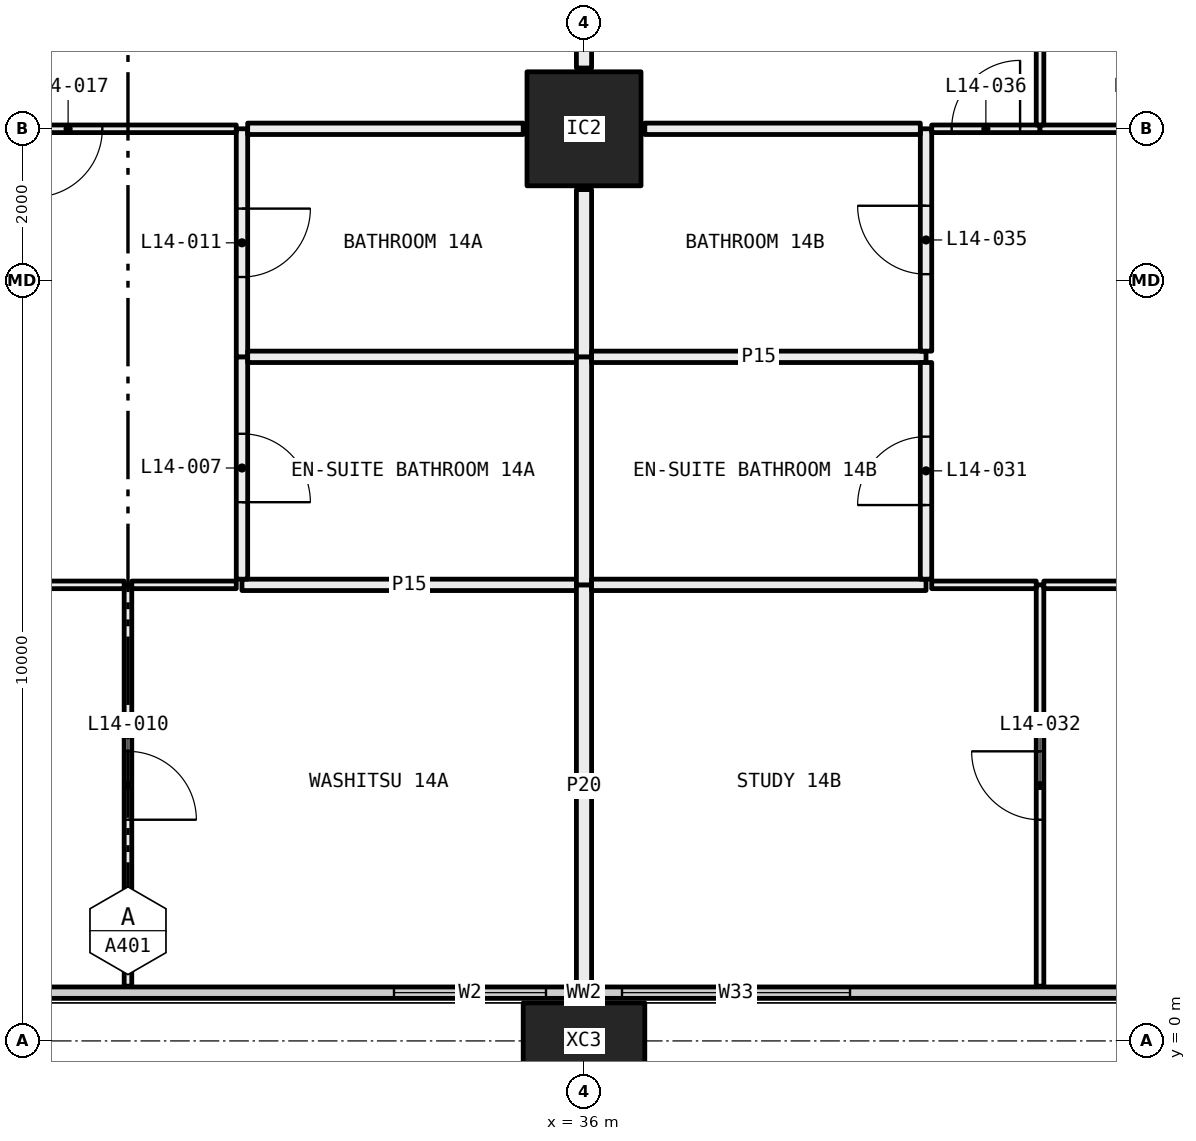
"""IFC4 building model, lengths in metres.
Left out: names, types, materials, properties, quantities, classifications, styles, units other than length and angle.
Written with IfcOpenShell. Run it as: python <this file> out.ifc"""

import sys

from ifc_helpers import new_model, si_unit, direction, frame, frame_2d, origin, origin_2d, place, context, subcontext, project, spatial, rectangle, hollow_rectangle, extrude, element, fill, save


model = new_model("IFC4")
c1 = context("Model", 3, precision=1e-05, world=origin(), true_north=direction((0.0, 1.0)))
c2 = subcontext(c1, "Body", "Model", "MODEL_VIEW")
j1 = project(units=[si_unit("LENGTHUNIT", "METRE"), si_unit("PLANEANGLEUNIT", "RADIAN")], contexts=[c1])
p1 = place(None, origin())
s1 = spatial("IfcSite", under=j1, at=p1, CompositionType="ELEMENT")
p2 = place(p1, origin())
s2 = spatial("IfcBuilding", under=s1, at=p2, CompositionType="ELEMENT")
p3 = place(p2, frame((0.0, 0.0, 61.05)))
s3 = spatial("IfcBuildingStorey", under=s2, at=p3, CompositionType="ELEMENT", Elevation=61.05)
p4 = place(p3, frame((36.0, 0.0, -0.4), z_axis=(0.0, 0.0, 1.0), x_axis=(1.0, 0.0, 0.0)))
e1 = element("IfcColumn", 1, at=p4, inside=s3, PredefinedType="COLUMN", context=c2, shape_type="SweptSolid", body=[
    extrude(hollow_rectangle(XDim=1.6, YDim=1.0, WallThickness=0.065, at=origin_2d()), origin(), (0.0, 0.0, 1.0), 3.45),
])
p5 = place(p3, frame((36.0, 12.0, 0.0), z_axis=(0.0, 0.0, 1.0), x_axis=(1.0, 0.0, 0.0)))
e2 = element("IfcColumn", 2, at=p5, inside=s3, PredefinedType="COLUMN", context=c2, shape_type="SweptSolid", body=[
    extrude(hollow_rectangle(XDim=1.5, YDim=1.5, WallThickness=0.065, at=origin_2d()), origin(), (0.0, 0.0, 1.0), 3.05),
])
p6 = place(p3, frame((6.56, 0.635, 0.0), z_axis=(0.0, 0.0, 1.0), x_axis=(1.0, 0.0, 0.0)))
e3 = element("IfcWall", 3, at=p6, inside=s3, PredefinedType="ELEMENTEDWALL", context=c2, shape_type="SweptSolid", body=[
    extrude(rectangle(XDim=58.88, YDim=0.15, at=frame_2d((29.44, 0.0))), origin(), (0.0, 0.0, 1.0), 3.05),
])
p7 = place(p6, frame((0.44, 0.0, 0.45)))
e4 = element("IfcOpeningElement", 4, at=p7, cuts=e3, PredefinedType="OPENING", context=c2, shape_type="SweptSolid", body=[
    extrude(rectangle(XDim=4.5, YDim=2.55, at=frame_2d((2.25, 1.275))), frame((0.0, 0.085, 0.0), z_axis=(0.0, -1.0, 0.0), x_axis=(1.0, 0.0, 0.0)), (0.0, 0.0, 1.0), 0.17),
])
p8 = place(p6, frame((5.94, 0.0, 0.45)))
e5 = element("IfcOpeningElement", 5, at=p8, cuts=e3, PredefinedType="OPENING", context=c2, shape_type="SweptSolid", body=[
    extrude(rectangle(XDim=3.0, YDim=2.55, at=frame_2d((1.5, 1.275))), frame((0.0, 0.085, 0.0), z_axis=(0.0, -1.0, 0.0), x_axis=(1.0, 0.0, 0.0)), (0.0, 0.0, 1.0), 0.17),
])
p9 = place(p6, frame((13.94, 0.0, 0.45)))
e6 = element("IfcOpeningElement", 6, at=p9, cuts=e3, PredefinedType="OPENING", context=c2, shape_type="SweptSolid", body=[
    extrude(rectangle(XDim=3.0, YDim=2.55, at=frame_2d((1.5, 1.275))), frame((0.0, 0.085, 0.0), z_axis=(0.0, -1.0, 0.0), x_axis=(1.0, 0.0, 0.0)), (0.0, 0.0, 1.0), 0.17),
])
p10 = place(p6, frame((17.94, 0.0, 0.45)))
e7 = element("IfcOpeningElement", 7, at=p10, cuts=e3, PredefinedType="OPENING", context=c2, shape_type="SweptSolid", body=[
    extrude(rectangle(XDim=3.0, YDim=2.55, at=frame_2d((1.5, 1.275))), frame((0.0, 0.085, 0.0), z_axis=(0.0, -1.0, 0.0), x_axis=(1.0, 0.0, 0.0)), (0.0, 0.0, 1.0), 0.17),
])
p11 = place(p6, frame((26.94, 0.0, 0.45)))
e8 = element("IfcOpeningElement", 8, at=p11, cuts=e3, PredefinedType="OPENING", context=c2, shape_type="SweptSolid", body=[
    extrude(rectangle(XDim=2.0, YDim=2.55, at=frame_2d((1.0, 1.275))), frame((0.0, 0.085, 0.0), z_axis=(0.0, -1.0, 0.0), x_axis=(1.0, 0.0, 0.0)), (0.0, 0.0, 1.0), 0.17),
])
p12 = place(p6, frame((29.94, 0.0, 0.45)))
e9 = element("IfcOpeningElement", 9, at=p12, cuts=e3, PredefinedType="OPENING", context=c2, shape_type="SweptSolid", body=[
    extrude(rectangle(XDim=3.0, YDim=2.55, at=frame_2d((1.5, 1.275))), frame((0.0, 0.085, 0.0), z_axis=(0.0, -1.0, 0.0), x_axis=(1.0, 0.0, 0.0)), (0.0, 0.0, 1.0), 0.17),
])
p13 = place(p6, frame((37.94, 0.0, 0.45)))
e10 = element("IfcOpeningElement", 10, at=p13, cuts=e3, PredefinedType="OPENING", context=c2, shape_type="SweptSolid", body=[
    extrude(rectangle(XDim=3.0, YDim=2.55, at=frame_2d((1.5, 1.275))), frame((0.0, 0.085, 0.0), z_axis=(0.0, -1.0, 0.0), x_axis=(1.0, 0.0, 0.0)), (0.0, 0.0, 1.0), 0.17),
])
p14 = place(p6, frame((41.94, 0.0, 0.45)))
e11 = element("IfcOpeningElement", 11, at=p14, cuts=e3, PredefinedType="OPENING", context=c2, shape_type="SweptSolid", body=[
    extrude(rectangle(XDim=3.0, YDim=2.55, at=frame_2d((1.5, 1.275))), frame((0.0, 0.085, 0.0), z_axis=(0.0, -1.0, 0.0), x_axis=(1.0, 0.0, 0.0)), (0.0, 0.0, 1.0), 0.17),
])
p15 = place(p6, frame((50.94, 0.0, 0.45)))
e12 = element("IfcOpeningElement", 12, at=p15, cuts=e3, PredefinedType="OPENING", context=c2, shape_type="SweptSolid", body=[
    extrude(rectangle(XDim=2.0, YDim=2.55, at=frame_2d((1.0, 1.275))), frame((0.0, 0.085, 0.0), z_axis=(0.0, -1.0, 0.0), x_axis=(1.0, 0.0, 0.0)), (0.0, 0.0, 1.0), 0.17),
])
p16 = place(p6, frame((53.94, 0.0, 0.45)))
e13 = element("IfcOpeningElement", 13, at=p16, cuts=e3, PredefinedType="OPENING", context=c2, shape_type="SweptSolid", body=[
    extrude(rectangle(XDim=4.5, YDim=2.55, at=frame_2d((2.25, 1.275))), frame((0.0, 0.085, 0.0), z_axis=(0.0, -1.0, 0.0), x_axis=(1.0, 0.0, 0.0)), (0.0, 0.0, 1.0), 0.17),
])
p17 = place(p3, frame((30.0, 0.72, 0.0), z_axis=(0.0, 0.0, 1.0), x_axis=(0.0, 1.0, 0.0)))
e14 = element("IfcWall", 14, at=p17, inside=s3, PredefinedType="PARTITIONING", context=c2, shape_type="SweptSolid", body=[
    extrude(rectangle(XDim=5.28, YDim=0.1, at=frame_2d((2.64, 0.0))), origin(), (0.0, 0.0, 1.0), 3.05),
])
p18 = place(p17, frame((2.19, 0.0, 0.0)))
e15 = element("IfcOpeningElement", 15, at=p18, cuts=e14, PredefinedType="OPENING", context=c2, shape_type="SweptSolid", body=[
    extrude(rectangle(XDim=0.9, YDim=2.1, at=frame_2d((0.45, 1.05))), frame((0.0, 0.06, 0.0), z_axis=(0.0, -1.0, 0.0), x_axis=(1.0, 0.0, 0.0)), (0.0, 0.0, 1.0), 0.12),
])
p19 = place(p3, frame((29.95, 6.0, 0.0), z_axis=(0.0, 0.0, 1.0), x_axis=(-1.0, 0.0, 0.0)))
e16 = element("IfcWall", 16, at=p19, inside=s3, PredefinedType="PARTITIONING", context=c2, shape_type="SweptSolid", body=[
    extrude(rectangle(XDim=6.145, YDim=0.1, at=frame_2d((3.073, 0.0))), origin(), (0.0, 0.0, 1.0), 2.45),
])
p20 = place(p3, frame((31.425, 6.0, 0.0), z_axis=(0.0, 0.0, 1.0), x_axis=(-1.0, 0.0, 0.0)))
e17 = element("IfcWall", 17, at=p20, inside=s3, PredefinedType="PARTITIONING", context=c2, shape_type="SweptSolid", body=[
    extrude(rectangle(XDim=1.375, YDim=0.1, at=frame_2d((0.688, 0.0))), origin(), (0.0, 0.0, 1.0), 3.05),
])
p21 = place(p3, frame((35.9, 6.0, 0.0), z_axis=(0.0, 0.0, 1.0), x_axis=(-1.0, 0.0, 0.0)))
e18 = element("IfcWall", 18, at=p21, inside=s3, PredefinedType="PARTITIONING", context=c2, shape_type="SweptSolid", body=[
    extrude(rectangle(XDim=4.4, YDim=0.15, at=frame_2d((2.2, 0.0))), origin(), (0.0, 0.0, 1.0), 3.05),
])
p22 = place(p3, frame((36.0, 0.72, 0.0), z_axis=(0.0, 0.0, 1.0), x_axis=(0.0, 1.0, 0.0)))
e19 = element("IfcWall", 19, at=p22, inside=s3, PredefinedType="PARTITIONING", context=c2, shape_type="SweptSolid", body=[
    extrude(rectangle(XDim=5.28, YDim=0.2, at=frame_2d((2.64, 0.0))), origin(), (0.0, 0.0, 1.0), 2.45),
])
p23 = place(p3, frame((31.5, 6.075, 0.0), z_axis=(0.0, 0.0, 1.0), x_axis=(0.0, 1.0, 0.0)))
e20 = element("IfcWall", 20, at=p23, inside=s3, PredefinedType="PARTITIONING", context=c2, shape_type="SweptSolid", body=[
    extrude(rectangle(XDim=2.925, YDim=0.15, at=frame_2d((1.462, 0.0))), origin(), (0.0, 0.0, 1.0), 3.05),
])
p24 = place(p23, frame((1.012, 0.0, 0.0)))
e21 = element("IfcOpeningElement", 21, at=p24, cuts=e20, PredefinedType="OPENING", context=c2, shape_type="SweptSolid", body=[
    extrude(rectangle(XDim=0.9, YDim=2.1, at=frame_2d((0.45, 1.05))), frame((0.0, 0.085, 0.0), z_axis=(0.0, -1.0, 0.0), x_axis=(1.0, 0.0, 0.0)), (0.0, 0.0, 1.0), 0.17),
])
p25 = place(p3, frame((31.5, 9.0, 0.0), z_axis=(0.0, 0.0, 1.0), x_axis=(0.0, 1.0, 0.0)))
e22 = element("IfcWall", 22, at=p25, inside=s3, PredefinedType="PARTITIONING", context=c2, shape_type="SweptSolid", body=[
    extrude(rectangle(XDim=3.0, YDim=0.15, at=frame_2d((1.5, 0.0))), origin(), (0.0, 0.0, 1.0), 2.45),
])
p26 = place(p25, frame((1.05, 0.0, 0.0)))
e23 = element("IfcOpeningElement", 23, at=p26, cuts=e22, PredefinedType="OPENING", context=c2, shape_type="SweptSolid", body=[
    extrude(rectangle(XDim=0.9, YDim=2.1, at=frame_2d((0.45, 1.05))), frame((0.0, 0.085, 0.0), z_axis=(0.0, -1.0, 0.0), x_axis=(1.0, 0.0, 0.0)), (0.0, 0.0, 1.0), 0.17),
])
p27 = place(p3, frame((31.425, 12.0, 0.0), z_axis=(0.0, 0.0, 1.0), x_axis=(-1.0, 0.0, 0.0)))
e24 = element("IfcWall", 24, at=p27, inside=s3, PredefinedType="PARTITIONING", context=c2, shape_type="SweptSolid", body=[
    extrude(rectangle(XDim=4.425, YDim=0.1, at=frame_2d((2.212, 0.0))), origin(), (0.0, 0.0, 1.0), 2.45),
])
p28 = place(p27, frame((1.762, 0.0, 0.0)))
e25 = element("IfcOpeningElement", 25, at=p28, cuts=e24, PredefinedType="OPENING", context=c2, shape_type="SweptSolid", body=[
    extrude(rectangle(XDim=0.9, YDim=2.1, at=frame_2d((0.45, 1.05))), frame((0.0, 0.06, 0.0), z_axis=(0.0, -1.0, 0.0), x_axis=(1.0, 0.0, 0.0)), (0.0, 0.0, 1.0), 0.12),
])
p29 = place(p3, frame((35.9, 9.0, 0.0), z_axis=(0.0, 0.0, 1.0), x_axis=(-1.0, 0.0, 0.0)))
e26 = element("IfcWall", 26, at=p29, inside=s3, PredefinedType="PARTITIONING", context=c2, shape_type="SweptSolid", body=[
    extrude(rectangle(XDim=4.325, YDim=0.15, at=frame_2d((2.163, 0.0))), origin(), (0.0, 0.0, 1.0), 3.05),
])
p30 = place(p3, frame((36.0, 6.0, 0.0), z_axis=(0.0, 0.0, 1.0), x_axis=(0.0, 1.0, 0.0)))
e27 = element("IfcWall", 27, at=p30, inside=s3, PredefinedType="PARTITIONING", context=c2, shape_type="SweptSolid", body=[
    extrude(rectangle(XDim=3.0, YDim=0.2, at=frame_2d((1.5, 0.0))), origin(), (0.0, 0.0, 1.0), 2.45),
])
p31 = place(p3, frame((35.2, 12.0, 0.0), z_axis=(0.0, 0.0, 1.0), x_axis=(-1.0, 0.0, 0.0)))
e28 = element("IfcWall", 28, at=p31, inside=s3, PredefinedType="PARTITIONING", context=c2, shape_type="SweptSolid", body=[
    extrude(rectangle(XDim=3.625, YDim=0.15, at=frame_2d((1.812, 0.0))), origin(), (0.0, 0.0, 1.0), 2.45),
])
p32 = place(p3, frame((36.0, 9.0, 0.0), z_axis=(0.0, 0.0, 1.0), x_axis=(0.0, 1.0, 0.0)))
e29 = element("IfcWall", 29, at=p32, inside=s3, PredefinedType="PARTITIONING", context=c2, shape_type="SweptSolid", body=[
    extrude(rectangle(XDim=2.2, YDim=0.2, at=frame_2d((1.1, 0.0))), origin(), (0.0, 0.0, 1.0), 2.45),
])
p33 = place(p3, frame((36.0, 12.8, 0.0), z_axis=(0.0, 0.0, 1.0), x_axis=(0.0, 1.0, 0.0)))
e30 = element("IfcWall", 30, at=p33, inside=s3, PredefinedType="PARTITIONING", context=c2, shape_type="SweptSolid", body=[
    extrude(rectangle(XDim=5.2, YDim=0.2, at=frame_2d((2.6, 0.0))), origin(), (0.0, 0.0, 1.0), 2.45),
])
p34 = place(p3, frame((42.0, 0.72, 0.0), z_axis=(0.0, 0.0, 1.0), x_axis=(0.0, 1.0, 0.0)))
e31 = element("IfcWall", 31, at=p34, inside=s3, PredefinedType="PARTITIONING", context=c2, shape_type="SweptSolid", body=[
    extrude(rectangle(XDim=5.28, YDim=0.1, at=frame_2d((2.64, 0.0))), origin(), (0.0, 0.0, 1.0), 3.05),
])
p35 = place(p34, frame((2.19, 0.0, 0.0)))
e32 = element("IfcOpeningElement", 32, at=p35, cuts=e31, PredefinedType="OPENING", context=c2, shape_type="SweptSolid", body=[
    extrude(rectangle(XDim=0.9, YDim=2.1, at=frame_2d((0.45, 1.05))), frame((0.0, 0.06, 0.0), z_axis=(0.0, -1.0, 0.0), x_axis=(1.0, 0.0, 0.0)), (0.0, 0.0, 1.0), 0.12),
])
p36 = place(p3, frame((40.5, 6.0, 0.0), z_axis=(0.0, 0.0, 1.0), x_axis=(-1.0, 0.0, 0.0)))
e33 = element("IfcWall", 33, at=p36, inside=s3, PredefinedType="PARTITIONING", context=c2, shape_type="SweptSolid", body=[
    extrude(rectangle(XDim=4.4, YDim=0.15, at=frame_2d((2.2, 0.0))), origin(), (0.0, 0.0, 1.0), 3.05),
])
p37 = place(p3, frame((41.95, 6.0, 0.0), z_axis=(0.0, 0.0, 1.0), x_axis=(-1.0, 0.0, 0.0)))
e34 = element("IfcWall", 34, at=p37, inside=s3, PredefinedType="PARTITIONING", context=c2, shape_type="SweptSolid", body=[
    extrude(rectangle(XDim=1.375, YDim=0.1, at=frame_2d((0.688, 0.0))), origin(), (0.0, 0.0, 1.0), 3.05),
])
p38 = place(p3, frame((48.195, 6.0, 0.0), z_axis=(0.0, 0.0, 1.0), x_axis=(-1.0, 0.0, 0.0)))
e35 = element("IfcWall", 35, at=p38, inside=s3, PredefinedType="PARTITIONING", context=c2, shape_type="SweptSolid", body=[
    extrude(rectangle(XDim=6.145, YDim=0.1, at=frame_2d((3.073, 0.0))), origin(), (0.0, 0.0, 1.0), 2.45),
])
p39 = place(p3, frame((40.5, 9.0, 0.0), z_axis=(0.0, 0.0, 1.0), x_axis=(-1.0, 0.0, 0.0)))
e36 = element("IfcWall", 36, at=p39, inside=s3, PredefinedType="PARTITIONING", context=c2, shape_type="SweptSolid", body=[
    extrude(rectangle(XDim=4.4, YDim=0.15, at=frame_2d((2.2, 0.0))), origin(), (0.0, 0.0, 1.0), 3.05),
])
p40 = place(p3, frame((40.5, 6.075, 0.0), z_axis=(0.0, 0.0, 1.0), x_axis=(0.0, 1.0, 0.0)))
e37 = element("IfcWall", 37, at=p40, inside=s3, PredefinedType="PARTITIONING", context=c2, shape_type="SweptSolid", body=[
    extrude(rectangle(XDim=2.85, YDim=0.15, at=frame_2d((1.425, 0.0))), origin(), (0.0, 0.0, 1.0), 3.05),
])
p41 = place(p40, frame((0.975, 0.0, 0.0)))
e38 = element("IfcOpeningElement", 38, at=p41, cuts=e37, PredefinedType="OPENING", context=c2, shape_type="SweptSolid", body=[
    extrude(rectangle(XDim=0.9, YDim=2.1, at=frame_2d((0.45, 1.05))), frame((0.0, 0.085, 0.0), z_axis=(0.0, -1.0, 0.0), x_axis=(1.0, 0.0, 0.0)), (0.0, 0.0, 1.0), 0.17),
])
p42 = place(p3, frame((40.5, 9.075, 0.0), z_axis=(0.0, 0.0, 1.0), x_axis=(0.0, 1.0, 0.0)))
e39 = element("IfcWall", 39, at=p42, inside=s3, PredefinedType="PARTITIONING", context=c2, shape_type="SweptSolid", body=[
    extrude(rectangle(XDim=2.925, YDim=0.15, at=frame_2d((1.462, 0.0))), origin(), (0.0, 0.0, 1.0), 2.45),
])
p43 = place(p42, frame((1.012, 0.0, 0.0)))
e40 = element("IfcOpeningElement", 40, at=p43, cuts=e39, PredefinedType="OPENING", context=c2, shape_type="SweptSolid", body=[
    extrude(rectangle(XDim=0.9, YDim=2.1, at=frame_2d((0.45, 1.05))), frame((0.0, 0.085, 0.0), z_axis=(0.0, -1.0, 0.0), x_axis=(1.0, 0.0, 0.0)), (0.0, 0.0, 1.0), 0.17),
])
p44 = place(p3, frame((40.425, 12.0, 0.0), z_axis=(0.0, 0.0, 1.0), x_axis=(-1.0, 0.0, 0.0)))
e41 = element("IfcWall", 41, at=p44, inside=s3, PredefinedType="PARTITIONING", context=c2, shape_type="SweptSolid", body=[
    extrude(rectangle(XDim=3.625, YDim=0.15, at=frame_2d((1.812, 0.0))), origin(), (0.0, 0.0, 1.0), 2.45),
])
p45 = place(p3, frame((42.0, 12.0, 0.0), z_axis=(0.0, 0.0, 1.0), x_axis=(-1.0, 0.0, 0.0)))
e42 = element("IfcWall", 42, at=p45, inside=s3, PredefinedType="PARTITIONING", context=c2, shape_type="SweptSolid", body=[
    extrude(rectangle(XDim=1.425, YDim=0.1, at=frame_2d((0.712, 0.0))), origin(), (0.0, 0.0, 1.0), 2.45),
])
p46 = place(p45, frame((0.262, 0.0, 0.0)))
e43 = element("IfcOpeningElement", 43, at=p46, cuts=e42, PredefinedType="OPENING", context=c2, shape_type="SweptSolid", body=[
    extrude(rectangle(XDim=0.9, YDim=2.1, at=frame_2d((0.45, 1.05))), frame((0.0, 0.06, 0.0), z_axis=(0.0, -1.0, 0.0), x_axis=(1.0, 0.0, 0.0)), (0.0, 0.0, 1.0), 0.12),
])
p47 = place(p3, frame((45.0, 12.0, 0.0), z_axis=(0.0, 0.0, 1.0), x_axis=(-1.0, 0.0, 0.0)))
e44 = element("IfcWall", 44, at=p47, inside=s3, PredefinedType="PARTITIONING", context=c2, shape_type="SweptSolid", body=[
    extrude(rectangle(XDim=3.0, YDim=0.1, at=frame_2d((1.5, 0.0))), origin(), (0.0, 0.0, 1.0), 2.45),
])
p48 = place(p47, frame((1.05, 0.0, 0.0)))
e45 = element("IfcOpeningElement", 45, at=p48, cuts=e44, PredefinedType="OPENING", context=c2, shape_type="SweptSolid", body=[
    extrude(rectangle(XDim=0.9, YDim=2.1, at=frame_2d((0.45, 1.05))), frame((0.0, 0.06, 0.0), z_axis=(0.0, -1.0, 0.0), x_axis=(1.0, 0.0, 0.0)), (0.0, 0.0, 1.0), 0.12),
])
p49 = place(p3, frame((42.0, 12.05, 0.0), z_axis=(0.0, 0.0, 1.0), x_axis=(0.0, 1.0, 0.0)))
e46 = element("IfcWall", 46, at=p49, inside=s3, PredefinedType="PARTITIONING", context=c2, shape_type="SweptSolid", body=[
    extrude(rectangle(XDim=5.95, YDim=0.1, at=frame_2d((2.975, 0.0))), origin(), (0.0, 0.0, 1.0), 2.45),
])
p50 = place(p11, origin())
e47 = element("IfcWindow", 47, at=p50, inside=s3, PartitioningType="SINGLE_PANEL", PredefinedType="WINDOW", context=c2, shape_type="SweptSolid", body=[
    extrude(rectangle(XDim=2.0, YDim=2.55, at=frame_2d((1.0, 1.275))), frame((0.0, 0.03, 0.0), z_axis=(0.0, -1.0, 0.0), x_axis=(1.0, 0.0, 0.0)), (0.0, 0.0, 1.0), 0.06),
])
fill(e8, e47)
p51 = place(p12, origin())
e48 = element("IfcWindow", 48, at=p51, inside=s3, PartitioningType="SINGLE_PANEL", PredefinedType="WINDOW", context=c2, shape_type="SweptSolid", body=[
    extrude(rectangle(XDim=3.0, YDim=2.55, at=frame_2d((1.5, 1.275))), frame((0.0, 0.03, 0.0), z_axis=(0.0, -1.0, 0.0), x_axis=(1.0, 0.0, 0.0)), (0.0, 0.0, 1.0), 0.06),
])
fill(e9, e48)
p52 = place(p24, frame((0.9, 0.0, 0.0), x_axis=(-1.0, 0.0, 0.0)))
e49 = element("IfcDoor", 49, at=p52, inside=s3, OperationType="SINGLE_SWING_LEFT", PredefinedType="DOOR", context=c2, shape_type="SweptSolid", body=[
    extrude(rectangle(XDim=0.9, YDim=2.1, at=frame_2d((0.45, 1.05))), frame((0.0, 0.025, 0.0), z_axis=(0.0, -1.0, 0.0), x_axis=(1.0, 0.0, 0.0)), (0.0, 0.0, 1.0), 0.05),
])
fill(e21, e49)
p53 = place(p18, frame((0.9, 0.0, 0.0), x_axis=(-1.0, 0.0, 0.0)))
e50 = element("IfcDoor", 50, at=p53, inside=s3, OperationType="SINGLE_SWING_LEFT", PredefinedType="DOOR", context=c2, shape_type="SweptSolid", body=[
    extrude(rectangle(XDim=0.9, YDim=2.1, at=frame_2d((0.45, 1.05))), frame((0.0, 0.025, 0.0), z_axis=(0.0, -1.0, 0.0), x_axis=(1.0, 0.0, 0.0)), (0.0, 0.0, 1.0), 0.05),
])
fill(e15, e50)
p54 = place(p26, frame((0.9, 0.0, 0.0), x_axis=(-1.0, 0.0, 0.0)))
e51 = element("IfcDoor", 51, at=p54, inside=s3, OperationType="SINGLE_SWING_RIGHT", PredefinedType="DOOR", context=c2, shape_type="SweptSolid", body=[
    extrude(rectangle(XDim=0.9, YDim=2.1, at=frame_2d((0.45, 1.05))), frame((0.0, 0.025, 0.0), z_axis=(0.0, -1.0, 0.0), x_axis=(1.0, 0.0, 0.0)), (0.0, 0.0, 1.0), 0.05),
])
fill(e23, e51)
p55 = place(p28, origin())
e52 = element("IfcDoor", 52, at=p55, inside=s3, OperationType="SINGLE_SWING_LEFT", PredefinedType="DOOR", context=c2, shape_type="SweptSolid", body=[
    extrude(rectangle(XDim=0.9, YDim=2.1, at=frame_2d((0.45, 1.05))), frame((0.0, 0.025, 0.0), z_axis=(0.0, -1.0, 0.0), x_axis=(1.0, 0.0, 0.0)), (0.0, 0.0, 1.0), 0.05),
])
fill(e25, e52)
p56 = place(p41, origin())
e53 = element("IfcDoor", 53, at=p56, inside=s3, OperationType="SINGLE_SWING_RIGHT", PredefinedType="DOOR", context=c2, shape_type="SweptSolid", body=[
    extrude(rectangle(XDim=0.9, YDim=2.1, at=frame_2d((0.45, 1.05))), frame((0.0, 0.025, 0.0), z_axis=(0.0, -1.0, 0.0), x_axis=(1.0, 0.0, 0.0)), (0.0, 0.0, 1.0), 0.05),
])
fill(e38, e53)
p57 = place(p35, origin())
e54 = element("IfcDoor", 54, at=p57, inside=s3, OperationType="SINGLE_SWING_LEFT", PredefinedType="DOOR", context=c2, shape_type="SweptSolid", body=[
    extrude(rectangle(XDim=0.9, YDim=2.1, at=frame_2d((0.45, 1.05))), frame((0.0, 0.025, 0.0), z_axis=(0.0, -1.0, 0.0), x_axis=(1.0, 0.0, 0.0)), (0.0, 0.0, 1.0), 0.05),
])
fill(e32, e54)
p58 = place(p43, origin())
e55 = element("IfcDoor", 55, at=p58, inside=s3, OperationType="SINGLE_SWING_LEFT", PredefinedType="DOOR", context=c2, shape_type="SweptSolid", body=[
    extrude(rectangle(XDim=0.9, YDim=2.1, at=frame_2d((0.45, 1.05))), frame((0.0, 0.025, 0.0), z_axis=(0.0, -1.0, 0.0), x_axis=(1.0, 0.0, 0.0)), (0.0, 0.0, 1.0), 0.05),
])
fill(e40, e55)
p59 = place(p46, frame((0.9, 0.0, 0.0), x_axis=(-1.0, 0.0, 0.0)))
e56 = element("IfcDoor", 56, at=p59, inside=s3, OperationType="SINGLE_SWING_LEFT", PredefinedType="DOOR", context=c2, shape_type="SweptSolid", body=[
    extrude(rectangle(XDim=0.9, YDim=2.1, at=frame_2d((0.45, 1.05))), frame((0.0, 0.025, 0.0), z_axis=(0.0, -1.0, 0.0), x_axis=(1.0, 0.0, 0.0)), (0.0, 0.0, 1.0), 0.05),
])
fill(e43, e56)
save(model, sys.argv[1])
